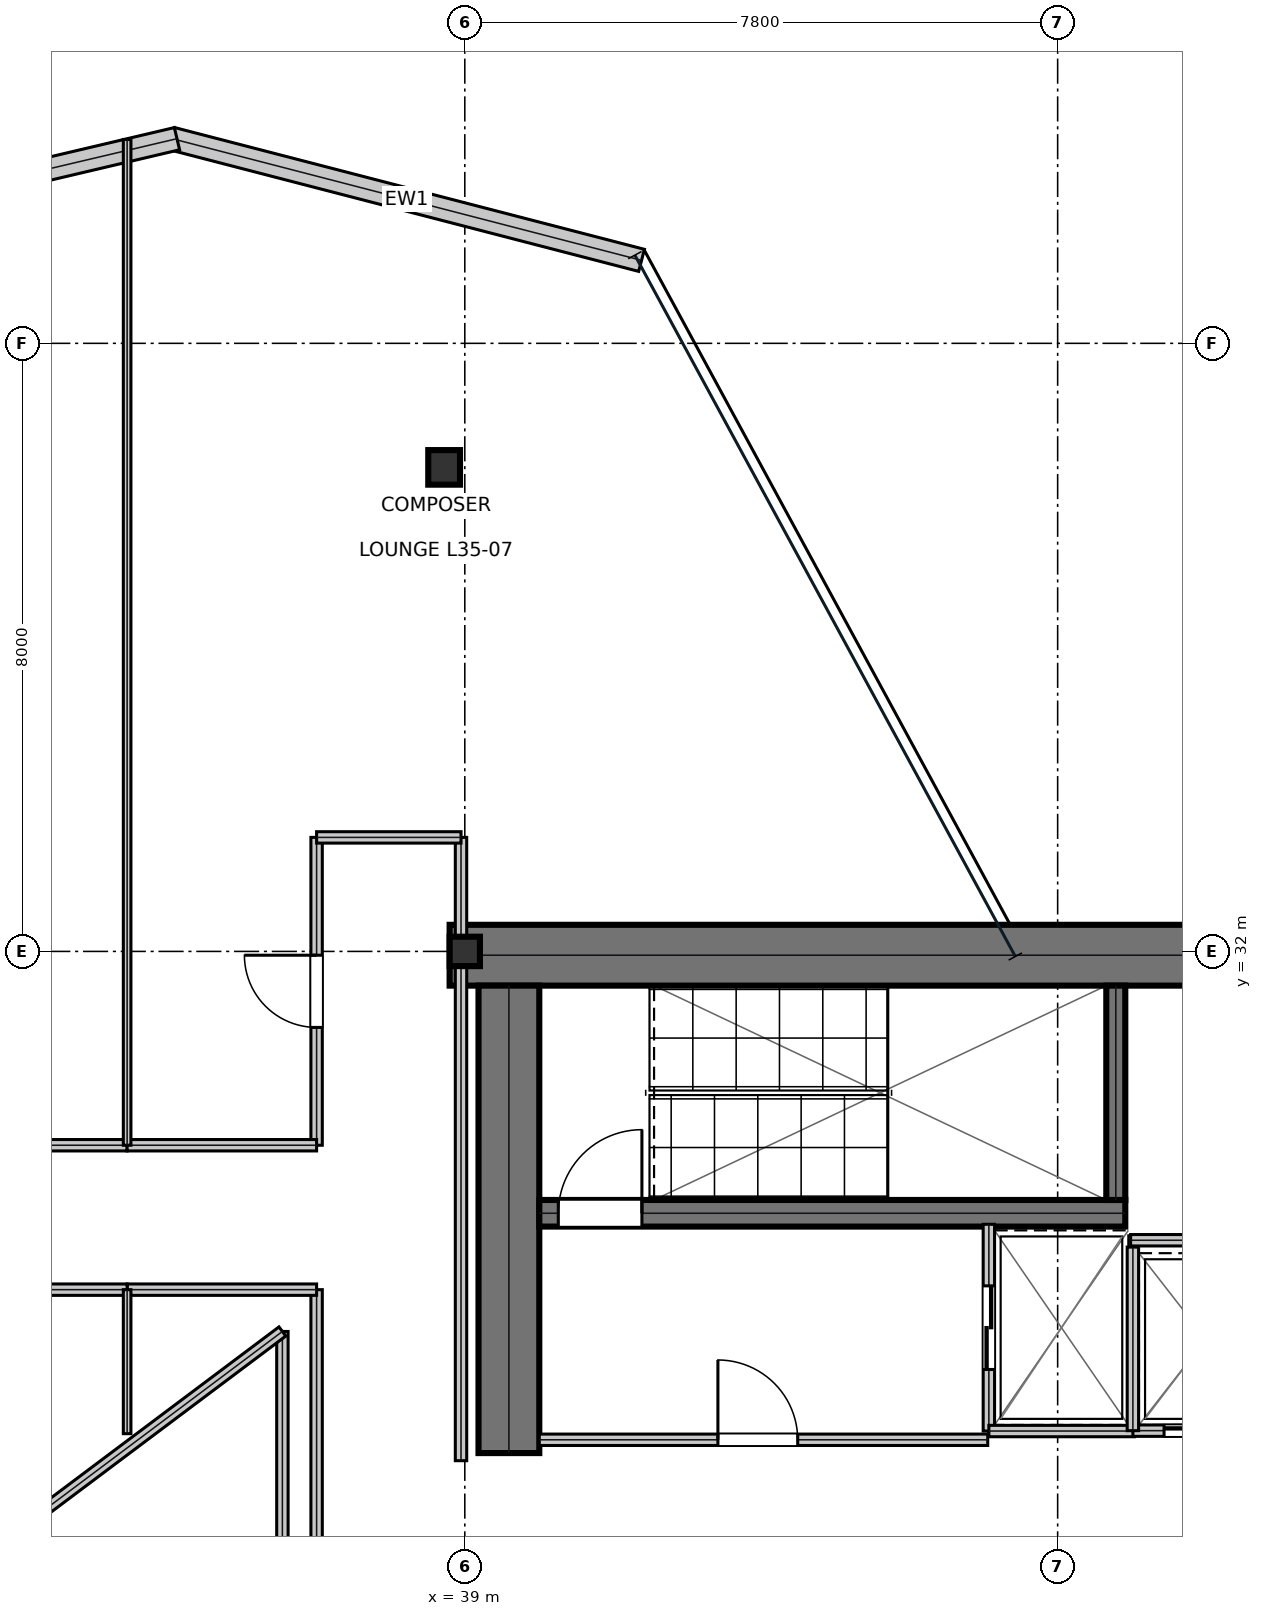
"""IFC4 building model, lengths in metres.
Left out: names, types, materials, properties, quantities, classifications, styles, units other than length and angle.
Written with IfcOpenShell. Run it as: python <this file> out.ifc"""

import sys

from ifc_helpers import new_model, si_unit, direction, frame, frame_2d, origin, origin_2d, place, context, subcontext, project, spatial, rectangle, i_section, extrude, element, fill, save


model = new_model("IFC4")
c1 = context("Model", 3, precision=1e-05, world=origin(), true_north=direction((0.0, 1.0)))
c2 = subcontext(c1, "Body", "Model", "MODEL_VIEW")
j1 = project(units=[si_unit("LENGTHUNIT", "METRE"), si_unit("PLANEANGLEUNIT", "RADIAN")], contexts=[c1])
p1 = place(None, origin())
s1 = spatial("IfcSite", under=j1, at=p1, CompositionType="ELEMENT")
p2 = place(p1, origin())
s2 = spatial("IfcBuilding", under=s1, at=p2, CompositionType="ELEMENT")
p3 = place(p2, frame((0.0, 0.0, 153.3)))
s3 = spatial("IfcBuildingStorey", under=s2, at=p3, CompositionType="ELEMENT", Elevation=153.3)
p4 = place(p3, frame((38.8, 31.95, 0.0), z_axis=(0.0, 0.0, 1.0), x_axis=(1.0, 0.0, 0.0)))
e1 = element("IfcWall", 1, at=p4, inside=s3, PredefinedType="SHEAR", context=c2, shape_type="SweptSolid", body=[
    extrude(rectangle(XDim=16.0, YDim=0.8, at=frame_2d((8.0, 0.0))), origin(), (0.0, 0.0, 1.0), 3.81),
])
p5 = place(p3, frame((39.58, 25.4, 0.0), z_axis=(0.0, 0.0, 1.0), x_axis=(0.0, 1.0, 0.0)))
e2 = element("IfcWall", 2, at=p5, inside=s3, PredefinedType="SHEAR", context=c2, shape_type="SweptSolid", body=[
    extrude(rectangle(XDim=6.15, YDim=0.8, at=frame_2d((3.075, 0.0))), origin(), (0.0, 0.0, 1.0), 3.81),
])
p6 = place(p3, frame((39.98, 28.555, 0.0), z_axis=(0.0, 0.0, 1.0), x_axis=(1.0, 0.0, 0.0)))
e3 = element("IfcWall", 3, at=p6, inside=s3, PredefinedType="SHEAR", context=c2, shape_type="SweptSolid", body=[
    extrude(rectangle(XDim=7.71, YDim=0.35, at=frame_2d((3.855, 0.0))), origin(), (0.0, 0.0, 1.0), 3.81),
])
p7 = place(p6, frame((0.25, 0.0, 0.0)))
e4 = element("IfcOpeningElement", 4, at=p7, cuts=e3, PredefinedType="OPENING", context=c2, shape_type="SweptSolid", body=[
    extrude(rectangle(XDim=1.1, YDim=2.15, at=frame_2d((0.55, 1.075))), frame((0.0, 0.185, 0.0), z_axis=(0.0, -1.0, 0.0), x_axis=(1.0, 0.0, 0.0)), (0.0, 0.0, 1.0), 0.37),
])
p8 = place(p3, frame((47.565, 28.73, 0.0), z_axis=(0.0, 0.0, 1.0), x_axis=(0.0, 1.0, 0.0)))
e5 = element("IfcWall", 5, at=p8, inside=s3, PredefinedType="SHEAR", context=c2, shape_type="SweptSolid", body=[
    extrude(rectangle(XDim=2.82, YDim=0.25, at=frame_2d((1.41, 0.0))), origin(), (0.0, 0.0, 1.0), 3.81),
])
p9 = place(p3, frame((39.0, 32.0, 0.0), z_axis=(0.0, 0.0, 1.0), x_axis=(1.0, 0.0, 0.0)))
e6 = element("IfcColumn", 6, at=p9, inside=s3, PredefinedType="COLUMN", context=c2, shape_type="SweptSolid", body=[
    extrude(i_section(OverallWidth=0.398, OverallDepth=0.387, WebThickness=0.021, FlangeThickness=0.033, at=origin_2d()), origin(), (0.0, 0.0, 1.0), 4.044),
])
p10 = place(p3, frame((38.728, 38.368, 0.016), z_axis=(0.0, 0.0, 1.0), x_axis=(1.0, 0.0, 0.0)))
e7 = element("IfcColumn", 7, at=p10, inside=s3, PredefinedType="COLUMN", context=c2, shape_type="SweptSolid", body=[
    extrude(i_section(OverallWidth=0.418, OverallDepth=0.455, WebThickness=0.042, FlangeThickness=0.068, at=origin_2d()), origin(), (0.0, 0.0, 1.0), 4.018),
])
p11 = place(p3, frame((41.325, 41.092, 0.0), z_axis=(0.0, 0.0, 1.0), x_axis=(-0.96801891639, 0.250877216005, 0.0)))
e8 = element("IfcWall", 8, at=p11, inside=s3, PredefinedType="STANDARD", context=c2, shape_type="SweptSolid", body=[
    extrude(rectangle(XDim=6.384, YDim=0.3, at=frame_2d((3.192, 0.0))), origin(), (0.0, 0.0, 1.0), 3.81),
])
p12 = place(p3, frame((35.213, 42.692, 0.0), z_axis=(0.0, 0.0, 1.0), x_axis=(-0.973355101444, -0.229302957882, 0.0)))
e9 = element("IfcWall", 9, at=p12, inside=s3, PredefinedType="STANDARD", context=c2, shape_type="SweptSolid", body=[
    extrude(rectangle(XDim=6.349, YDim=0.3, at=frame_2d((3.174, 0.0))), origin(), (0.0, 0.0, 1.0), 3.81),
])
p13 = place(p3, frame((39.98, 25.575, 0.0), z_axis=(0.0, 0.0, 1.0), x_axis=(1.0, 0.0, 0.0)))
e10 = element("IfcWall", 10, at=p13, inside=s3, PredefinedType="PARTITIONING", context=c2, shape_type="SweptSolid", body=[
    extrude(rectangle(XDim=5.9, YDim=0.15, at=frame_2d((2.95, 0.0))), origin(), (0.0, 0.0, 1.0), 3.81),
])
p14 = place(p13, frame((2.35, 0.0, 0.0)))
e11 = element("IfcOpeningElement", 11, at=p14, cuts=e10, PredefinedType="OPENING", context=c2, shape_type="SweptSolid", body=[
    extrude(rectangle(XDim=1.05, YDim=2.15, at=frame_2d((0.525, 1.075))), frame((0.0, 0.085, 0.0), z_axis=(0.0, -1.0, 0.0), x_axis=(1.0, 0.0, 0.0)), (0.0, 0.0, 1.0), 0.17),
])
p15 = place(p3, frame((45.895, 25.69, 0.0), z_axis=(0.0, 0.0, 1.0), x_axis=(0.0, 1.0, 0.0)))
e12 = element("IfcWall", 12, at=p15, inside=s3, PredefinedType="PARTITIONING", context=c2, shape_type="SweptSolid", body=[
    extrude(rectangle(XDim=2.72, YDim=0.15, at=frame_2d((1.36, 0.0))), origin(), (0.0, 0.0, 1.0), 3.81),
])
p16 = place(p15, frame((0.81, 0.0, 0.0)))
e13 = element("IfcOpeningElement", 13, at=p16, cuts=e12, PredefinedType="OPENING", context=c2, shape_type="SweptSolid", body=[
    extrude(rectangle(XDim=1.1, YDim=2.15, at=frame_2d((0.55, 1.075))), frame((0.0, 0.085, 0.0), z_axis=(0.0, -1.0, 0.0), x_axis=(1.0, 0.0, 0.0)), (0.0, 0.0, 1.0), 0.17),
])
p17 = place(p3, frame((45.895, 25.69, 0.0), z_axis=(0.0, 0.0, 1.0), x_axis=(1.0, 0.0, 0.0)))
e14 = element("IfcWall", 14, at=p17, inside=s3, PredefinedType="PARTITIONING", context=c2, shape_type="SweptSolid", body=[
    extrude(rectangle(XDim=1.915, YDim=0.15, at=frame_2d((0.958, 0.0))), origin(), (0.0, 0.0, 1.0), 3.81),
])
p18 = place(p3, frame((47.79, 25.695, 0.0), z_axis=(0.0, 0.0, 1.0), x_axis=(1.0, 0.0, 0.0)))
e15 = element("IfcWall", 15, at=p18, inside=s3, PredefinedType="PARTITIONING", context=c2, shape_type="SweptSolid", body=[
    extrude(rectangle(XDim=1.92, YDim=0.15, at=frame_2d((0.96, 0.0))), origin(), (0.0, 0.0, 1.0), 3.81),
])
p19 = place(p18, frame((0.41, 0.0, 0.0)))
e16 = element("IfcOpeningElement", 16, at=p19, cuts=e15, PredefinedType="OPENING", context=c2, shape_type="SweptSolid", body=[
    extrude(rectangle(XDim=1.1, YDim=2.15, at=frame_2d((0.55, 1.075))), frame((0.0, 0.085, 0.0), z_axis=(0.0, -1.0, 0.0), x_axis=(1.0, 0.0, 0.0)), (0.0, 0.0, 1.0), 0.17),
])
p20 = place(p3, frame((47.79, 25.695, 0.0), z_axis=(0.0, 0.0, 1.0), x_axis=(0.0, 1.0, 0.0)))
e17 = element("IfcWall", 17, at=p20, inside=s3, PredefinedType="PARTITIONING", context=c2, shape_type="SweptSolid", body=[
    extrude(rectangle(XDim=2.415, YDim=0.15, at=frame_2d((1.208, 0.0))), origin(), (0.0, 0.0, 1.0), 3.81),
])
p21 = place(p3, frame((47.76, 28.2, 0.0), z_axis=(0.0, 0.0, 1.0), x_axis=(1.0, 0.0, 0.0)))
e18 = element("IfcWall", 18, at=p21, inside=s3, PredefinedType="PARTITIONING", context=c2, shape_type="SweptSolid", body=[
    extrude(rectangle(XDim=1.99, YDim=0.15, at=frame_2d((0.995, 0.0))), origin(), (0.0, 0.0, 1.0), 3.81),
])
p22 = place(p3, frame((37.05, 14.5, 0.0), z_axis=(0.0, 0.0, 1.0), x_axis=(0.0, 1.0, 0.0)))
e19 = element("IfcWall", 19, at=p22, inside=s3, PredefinedType="PARTITIONING", context=c2, shape_type="SweptSolid", body=[
    extrude(rectangle(XDim=13.05, YDim=0.15, at=frame_2d((6.525, 0.0))), origin(), (0.0, 0.0, 1.0), 3.19),
])
p23 = place(p22, frame((4.61, 0.0, 0.0)))
e20 = element("IfcOpeningElement", 20, at=p23, cuts=e19, PredefinedType="OPENING", context=c2, shape_type="SweptSolid", body=[
    extrude(rectangle(XDim=0.95, YDim=2.15, at=frame_2d((0.475, 1.075))), frame((0.0, 0.085, 0.0), z_axis=(0.0, -1.0, 0.0), x_axis=(1.0, 0.0, 0.0)), (0.0, 0.0, 1.0), 0.17),
])
p24 = place(p3, frame((37.05, 29.45, 0.0), z_axis=(0.0, 0.0, 1.0), x_axis=(0.0, 1.0, 0.0)))
e21 = element("IfcWall", 21, at=p24, inside=s3, PredefinedType="PARTITIONING", context=c2, shape_type="SweptSolid", body=[
    extrude(rectangle(XDim=4.05, YDim=0.15, at=frame_2d((2.025, 0.0))), origin(), (0.0, 0.0, 1.0), 3.19),
])
p25 = place(p24, frame((1.55, 0.0, 0.0)))
e22 = element("IfcOpeningElement", 22, at=p25, cuts=e21, PredefinedType="OPENING", context=c2, shape_type="SweptSolid", body=[
    extrude(rectangle(XDim=0.95, YDim=2.15, at=frame_2d((0.475, 1.075))), frame((0.0, 0.085, 0.0), z_axis=(0.0, -1.0, 0.0), x_axis=(1.0, 0.0, 0.0)), (0.0, 0.0, 1.0), 0.17),
])
p26 = place(p3, frame((34.557, 27.55, 0.0), z_axis=(0.0, 0.0, 1.0), x_axis=(1.0, 0.0, 0.0)))
e23 = element("IfcWall", 23, at=p26, inside=s3, PredefinedType="PARTITIONING", context=c2, shape_type="SweptSolid", body=[
    extrude(rectangle(XDim=2.493, YDim=0.15, at=frame_2d((1.247, 0.0))), origin(), (0.0, 0.0, 1.0), 3.443),
])
for number, where, z_axis, x_axis in (
    (24, (29.4, 27.55, 0.0), (0.0, 0.0, 1.0), (1.0, 0.0, 0.0)),
    (25, (29.4, 29.45, 0.0), (0.0, 0.0, 1.0), (1.0, 0.0, 0.0)),
):
    element("IfcWall", number, at=place(p3, frame(where, z_axis=z_axis, x_axis=x_axis)), inside=s3, PredefinedType="PARTITIONING", context=c2, shape_type="SweptSolid", body=[
        extrude(rectangle(XDim=5.157, YDim=0.15, at=frame_2d((2.579, 0.0))), origin(), (0.0, 0.0, 1.0), 3.19),
    ])
p27 = place(p3, frame((38.95, 25.3, 0.0), z_axis=(0.0, 0.0, 1.0), x_axis=(0.0, 1.0, 0.0)))
e26 = element("IfcWall", 26, at=p27, inside=s3, PredefinedType="PARTITIONING", context=c2, shape_type="SweptSolid", body=[
    extrude(rectangle(XDim=8.2, YDim=0.15, at=frame_2d((4.1, 0.0))), origin(), (0.0, 0.0, 1.0), 3.19),
])
p28 = place(p3, frame((34.557, 29.45, 0.0), z_axis=(0.0, 0.0, 1.0), x_axis=(1.0, 0.0, 0.0)))
e27 = element("IfcWall", 27, at=p28, inside=s3, PredefinedType="PARTITIONING", context=c2, shape_type="SweptSolid", body=[
    extrude(rectangle(XDim=2.493, YDim=0.15, at=frame_2d((1.247, 0.0))), origin(), (0.0, 0.0, 1.0), 3.81),
])
p29 = place(p3, frame((37.05, 33.5, 0.0), z_axis=(0.0, 0.0, 1.0), x_axis=(1.0, 0.0, 0.0)))
e28 = element("IfcWall", 28, at=p29, inside=s3, PredefinedType="PARTITIONING", context=c2, shape_type="SweptSolid", body=[
    extrude(rectangle(XDim=1.9, YDim=0.15, at=frame_2d((0.95, 0.0))), origin(), (0.0, 0.0, 1.0), 3.19),
])
p30 = place(p3, frame((34.557, 25.655, 0.0), z_axis=(0.0, 0.0, 1.0), x_axis=(0.0, 1.0, 0.0)))
e29 = element("IfcWall", 29, at=p30, inside=s3, PredefinedType="PARTITIONING", context=c2, shape_type="SweptSolid", body=[
    extrude(rectangle(XDim=1.895, YDim=0.1, at=frame_2d((0.947, 0.0))), origin(), (0.0, 0.0, 1.0), 3.81),
])
p31 = place(p3, frame((34.557, 29.45, 0.0), z_axis=(0.0, 0.0, 1.0), x_axis=(0.0, 1.0, 0.0)))
e30 = element("IfcWall", 30, at=p31, inside=s3, PredefinedType="PARTITIONING", context=c2, shape_type="SweptSolid", body=[
    extrude(rectangle(XDim=13.232, YDim=0.1, at=frame_2d((6.616, 0.0))), origin(), (0.0, 0.0, 1.0), 3.19),
])
p32 = place(p3, frame((36.6, 21.0, 0.0), z_axis=(0.0, 0.0, 1.0), x_axis=(0.0, 1.0, 0.0)))
e31 = element("IfcWall", 31, at=p32, inside=s3, PredefinedType="MOVABLE", context=c2, shape_type="SweptSolid", body=[
    extrude(rectangle(XDim=6.0, YDim=0.15, at=frame_2d((3.0, 0.0))), origin(), (0.0, 0.0, 1.0), 3.81),
])
p33 = place(p3, frame((36.6, 27.0, 0.0), z_axis=(0.0, 0.0, 1.0), x_axis=(-0.8, -0.6, 0.0)))
e32 = element("IfcWall", 32, at=p33, inside=s3, PredefinedType="MOVABLE", context=c2, shape_type="SweptSolid", body=[
    extrude(rectangle(XDim=5.0, YDim=0.15, at=frame_2d((2.5, 0.0))), origin(), (0.0, 0.0, 1.0), 3.81),
])
p34 = place(p14, origin())
e33 = element("IfcDoor", 33, at=p34, inside=s3, OperationType="SINGLE_SWING_LEFT", PredefinedType="DOOR", context=c2, shape_type="SweptSolid", body=[
    extrude(rectangle(XDim=1.05, YDim=2.15, at=frame_2d((0.525, 1.075))), frame((0.0, 0.025, 0.0), z_axis=(0.0, -1.0, 0.0), x_axis=(1.0, 0.0, 0.0)), (0.0, 0.0, 1.0), 0.05),
])
fill(e11, e33)
p35 = place(p16, frame((1.1, 0.0, 0.0), z_axis=(0.0, 0.0, 1.0), x_axis=(-1.0, 0.0, 0.0)))
e34 = element("IfcDoor", 34, at=p35, inside=s3, OperationType="DOUBLE_DOOR_SLIDING", PredefinedType="DOOR", context=c2, shape_type="SweptSolid", body=[
    extrude(rectangle(XDim=1.1, YDim=2.15, at=frame_2d((0.55, 1.075))), frame((0.0, 0.025, 0.0), z_axis=(0.0, -1.0, 0.0), x_axis=(1.0, 0.0, 0.0)), (0.0, 0.0, 1.0), 0.05),
])
fill(e13, e34)
p36 = place(p19, frame((1.1, 0.0, 0.0), z_axis=(0.0, 0.0, 1.0), x_axis=(-1.0, 0.0, 0.0)))
e35 = element("IfcDoor", 35, at=p36, inside=s3, OperationType="DOUBLE_DOOR_SLIDING", PredefinedType="DOOR", context=c2, shape_type="SweptSolid", body=[
    extrude(rectangle(XDim=1.1, YDim=2.15, at=frame_2d((0.55, 1.075))), frame((0.0, 0.025, 0.0), z_axis=(0.0, -1.0, 0.0), x_axis=(1.0, 0.0, 0.0)), (0.0, 0.0, 1.0), 0.05),
])
fill(e16, e35)
p37 = place(p25, origin())
e36 = element("IfcDoor", 36, at=p37, inside=s3, OperationType="SINGLE_SWING_RIGHT", PredefinedType="DOOR", context=c2, shape_type="SweptSolid", body=[
    extrude(rectangle(XDim=0.95, YDim=2.15, at=frame_2d((0.475, 1.075))), frame((0.0, 0.025, 0.0), z_axis=(0.0, -1.0, 0.0), x_axis=(1.0, 0.0, 0.0)), (0.0, 0.0, 1.0), 0.05),
])
fill(e22, e36)
p38 = place(p7, origin())
e37 = element("IfcDoor", 37, at=p38, inside=s3, OperationType="SINGLE_SWING_RIGHT", PredefinedType="DOOR", context=c2, shape_type="SweptSolid", body=[
    extrude(rectangle(XDim=1.1, YDim=2.15, at=frame_2d((0.55, 1.075))), frame((0.0, 0.025, 0.0), z_axis=(0.0, -1.0, 0.0), x_axis=(1.0, 0.0, 0.0)), (0.0, 0.0, 1.0), 0.05),
])
fill(e4, e37)
save(model, sys.argv[1])
